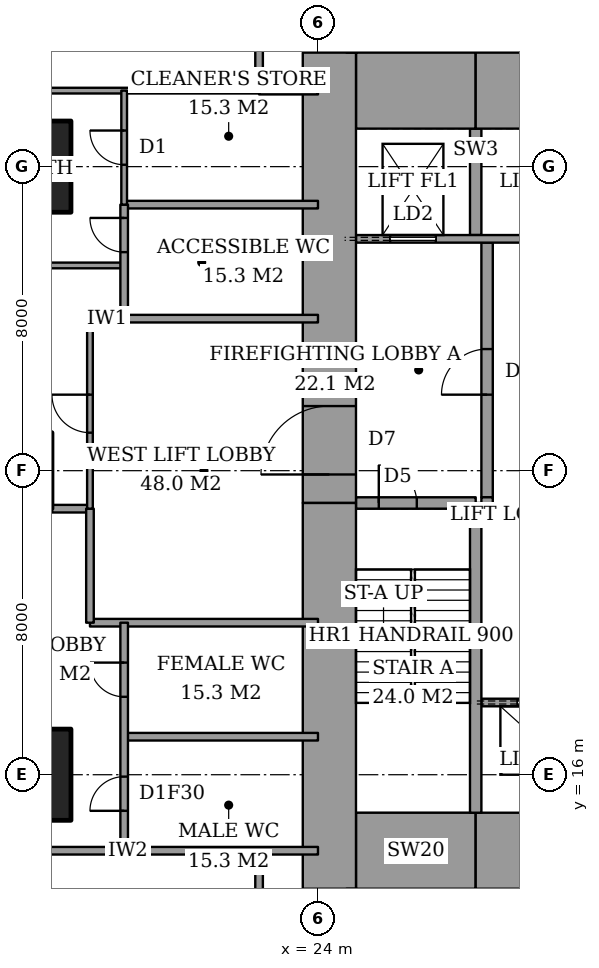
"""IFC4 building model, lengths in metres.
Left out: names, types, materials, properties, quantities, classifications, styles, units other than length and angle.
Written with IfcOpenShell. Run it as: python <this file> out.ifc"""

import sys

from ifc_helpers import new_model, si_unit, direction, frame, frame_2d, origin, origin_2d, place, context, subcontext, project, spatial, rectangle, extrude, element, fill, save


model = new_model("IFC4")
c1 = context("Model", 3, precision=1e-05, world=origin(), true_north=direction((0.0, 1.0)))
c2 = subcontext(c1, "Body", "Model", "MODEL_VIEW")
j1 = project(units=[si_unit("LENGTHUNIT", "METRE"), si_unit("PLANEANGLEUNIT", "RADIAN")], contexts=[c1])
p1 = place(None, origin())
s1 = spatial("IfcSite", under=j1, at=p1, CompositionType="ELEMENT")
p2 = place(p1, origin())
s2 = spatial("IfcBuilding", under=s1, at=p2, CompositionType="ELEMENT")
p3 = place(p2, frame((0.0, 0.0, 16.0)))
s3 = spatial("IfcBuildingStorey", under=s2, at=p3, CompositionType="ELEMENT", Elevation=16.0)
for number, where, z_axis, x_axis in (
    (1, (16.0, 16.0, 0.0), (0.0, 0.0, 1.0), (1.0, 0.0, 0.0)),
    (2, (16.0, 32.0, 0.0), (0.0, 0.0, 1.0), (1.0, 0.0, 0.0)),
):
    element("IfcColumn", number, at=place(p3, frame(where, z_axis=z_axis, x_axis=x_axis)), inside=s3, PredefinedType="COLUMN", context=c2, shape_type="SweptSolid", body=[
        extrude(rectangle(XDim=3.0, YDim=2.4, at=origin_2d()), origin(), (0.0, 0.0, 1.0), 5.0),
    ])
p4 = place(p3, frame((25.0, 14.0, 0.0), z_axis=(0.0, 0.0, 1.0), x_axis=(1.0, 0.0, 0.0)))
e3 = element("IfcWall", 3, at=p4, inside=s3, PredefinedType="SHEAR", context=c2, shape_type="SweptSolid", body=[
    extrude(rectangle(XDim=3.15, YDim=2.0, at=frame_2d((1.575, 0.0))), origin(), (0.0, 0.0, 1.0), 5.0),
])
p5 = place(p3, frame((28.15, 14.0, 0.0), z_axis=(0.0, 0.0, 1.0), x_axis=(1.0, 0.0, 0.0)))
e4 = element("IfcWall", 4, at=p5, inside=s3, PredefinedType="SHEAR", context=c2, shape_type="SweptSolid", body=[
    extrude(rectangle(XDim=9.7, YDim=2.0, at=frame_2d((4.85, 0.0))), origin(), (0.0, 0.0, 1.0), 5.0),
])
p6 = place(p3, frame((25.0, 34.0, 0.0), z_axis=(0.0, 0.0, 1.0), x_axis=(1.0, 0.0, 0.0)))
e5 = element("IfcWall", 5, at=p6, inside=s3, PredefinedType="SHEAR", context=c2, shape_type="SweptSolid", body=[
    extrude(rectangle(XDim=3.15, YDim=2.0, at=frame_2d((1.575, 0.0))), origin(), (0.0, 0.0, 1.0), 5.0),
])
p7 = place(p3, frame((28.15, 34.0, 0.0), z_axis=(0.0, 0.0, 1.0), x_axis=(1.0, 0.0, 0.0)))
e6 = element("IfcWall", 6, at=p7, inside=s3, PredefinedType="SHEAR", context=c2, shape_type="SweptSolid", body=[
    extrude(rectangle(XDim=9.7, YDim=2.0, at=frame_2d((4.85, 0.0))), origin(), (0.0, 0.0, 1.0), 5.0),
])
p8 = place(p3, frame((24.3, 13.0, 0.0), z_axis=(0.0, 0.0, 1.0), x_axis=(0.0, 1.0, 0.0)))
e7 = element("IfcWall", 7, at=p8, inside=s3, PredefinedType="SHEAR", context=c2, shape_type="SweptSolid", body=[
    extrude(rectangle(XDim=10.15, YDim=1.4, at=frame_2d((5.075, 0.0))), origin(), (0.0, 0.0, 1.0), 5.0),
])
p9 = place(p3, frame((24.3, 23.15, 0.0), z_axis=(0.0, 0.0, 1.0), x_axis=(0.0, 1.0, 0.0)))
e8 = element("IfcWall", 8, at=p9, inside=s3, PredefinedType="SHEAR", context=c2, shape_type="SweptSolid", body=[
    extrude(rectangle(XDim=11.85, YDim=1.4, at=frame_2d((5.925, 0.0))), origin(), (0.0, 0.0, 1.0), 5.0),
])
p10 = place(p9, frame((0.75, 0.0, 0.0)))
e9 = element("IfcOpeningElement", 9, at=p10, cuts=e8, PredefinedType="OPENING", context=c2, shape_type="SweptSolid", body=[
    extrude(rectangle(XDim=1.8, YDim=2.4, at=frame_2d((0.9, 1.2))), frame((0.0, 0.71, 0.0), z_axis=(0.0, -1.0, 0.0), x_axis=(1.0, 0.0, 0.0)), (0.0, 0.0, 1.0), 1.42),
])
p11 = place(p3, frame((28.15, 15.0, 0.0), z_axis=(0.0, 0.0, 1.0), x_axis=(0.0, 1.0, 0.0)))
e10 = element("IfcWall", 10, at=p11, inside=s3, PredefinedType="SHEAR", context=c2, shape_type="SweptSolid", body=[
    extrude(rectangle(XDim=8.15, YDim=0.3, at=frame_2d((4.075, 0.0))), origin(), (0.0, 0.0, 1.0), 5.0),
])
p12 = place(p3, frame((25.0, 23.15, 0.0), z_axis=(0.0, 0.0, 1.0), x_axis=(1.0, 0.0, 0.0)))
e11 = element("IfcWall", 11, at=p12, inside=s3, PredefinedType="SHEAR", context=c2, shape_type="SweptSolid", body=[
    extrude(rectangle(XDim=3.15, YDim=0.3, at=frame_2d((1.575, 0.0))), origin(), (0.0, 0.0, 1.0), 5.0),
])
p13 = place(p12, frame((0.6, 0.0, 0.0)))
e12 = element("IfcOpeningElement", 12, at=p13, cuts=e11, PredefinedType="OPENING", context=c2, shape_type="SweptSolid", body=[
    extrude(rectangle(XDim=1.0, YDim=2.1, at=frame_2d((0.5, 1.05))), frame((0.0, 0.16, 0.0), z_axis=(0.0, -1.0, 0.0), x_axis=(1.0, 0.0, 0.0)), (0.0, 0.0, 1.0), 0.32),
])
p14 = place(p3, frame((28.45, 23.3, 0.0), z_axis=(0.0, 0.0, 1.0), x_axis=(0.0, 1.0, 0.0)))
e13 = element("IfcWall", 13, at=p14, inside=s3, PredefinedType="PARTITIONING", context=c2, shape_type="SweptSolid", body=[
    extrude(rectangle(XDim=6.7, YDim=0.3, at=frame_2d((3.35, 0.0))), origin(), (0.0, 0.0, 1.0), 5.0),
])
p15 = place(p14, frame((2.7, 0.0, 0.0)))
e14 = element("IfcOpeningElement", 14, at=p15, cuts=e13, PredefinedType="OPENING", context=c2, shape_type="SweptSolid", body=[
    extrude(rectangle(XDim=1.2, YDim=2.1, at=frame_2d((0.6, 1.05))), frame((0.0, 0.16, 0.0), z_axis=(0.0, -1.0, 0.0), x_axis=(1.0, 0.0, 0.0)), (0.0, 0.0, 1.0), 0.32),
])
p16 = place(p3, frame((14.0, 14.0, 0.0), z_axis=(0.0, 0.0, 1.0), x_axis=(1.0, 0.0, 0.0)))
e15 = element("IfcWall", 15, at=p16, inside=s3, PredefinedType="PARTITIONING", context=c2, shape_type="SweptSolid", body=[
    extrude(rectangle(XDim=10.0, YDim=0.2, at=frame_2d((5.0, 0.0))), origin(), (0.0, 0.0, 1.0), 4.7),
])
p17 = place(p3, frame((18.9, 17.0, 0.0), z_axis=(0.0, 0.0, 1.0), x_axis=(1.0, 0.0, 0.0)))
e16 = element("IfcWall", 16, at=p17, inside=s3, PredefinedType="PARTITIONING", context=c2, shape_type="SweptSolid", body=[
    extrude(rectangle(XDim=5.1, YDim=0.2, at=frame_2d((2.55, 0.0))), origin(), (0.0, 0.0, 1.0), 4.7),
])
p18 = place(p3, frame((18.0, 20.0, 0.0), z_axis=(0.0, 0.0, 1.0), x_axis=(1.0, 0.0, 0.0)))
e17 = element("IfcWall", 17, at=p18, inside=s3, PredefinedType="PARTITIONING", context=c2, shape_type="SweptSolid", body=[
    extrude(rectangle(XDim=6.0, YDim=0.2, at=frame_2d((3.0, 0.0))), origin(), (0.0, 0.0, 1.0), 4.7),
])
p19 = place(p3, frame((17.0, 23.0, 0.0), z_axis=(0.0, 0.0, 1.0), x_axis=(1.0, 0.0, 0.0)))
e18 = element("IfcWall", 18, at=p19, inside=s3, PredefinedType="PARTITIONING", context=c2, shape_type="SweptSolid", body=[
    extrude(rectangle(XDim=1.0, YDim=0.2, at=frame_2d((0.5, 0.0))), origin(), (0.0, 0.0, 1.0), 4.7),
])
p20 = place(p3, frame((18.9, 28.0, 0.0), z_axis=(0.0, 0.0, 1.0), x_axis=(1.0, 0.0, 0.0)))
e19 = element("IfcWall", 19, at=p20, inside=s3, PredefinedType="PARTITIONING", context=c2, shape_type="SweptSolid", body=[
    extrude(rectangle(XDim=5.1, YDim=0.2, at=frame_2d((2.55, 0.0))), origin(), (0.0, 0.0, 1.0), 4.7),
])
p21 = place(p3, frame((18.0, 28.0, 0.0), z_axis=(0.0, 0.0, 1.0), x_axis=(1.0, 0.0, 0.0)))
e20 = element("IfcWall", 20, at=p21, inside=s3, PredefinedType="PARTITIONING", context=c2, shape_type="SweptSolid", body=[
    extrude(rectangle(XDim=0.9, YDim=0.15, at=frame_2d((0.45, 0.0))), origin(), (0.0, 0.0, 1.0), 4.7),
])
p22 = place(p3, frame((6.0, 29.4, 0.0), z_axis=(0.0, 0.0, 1.0), x_axis=(1.0, 0.0, 0.0)))
e21 = element("IfcWall", 21, at=p22, inside=s3, PredefinedType="PARTITIONING", context=c2, shape_type="SweptSolid", body=[
    extrude(rectangle(XDim=12.9, YDim=0.15, at=frame_2d((6.45, 0.0))), origin(), (0.0, 0.0, 1.0), 4.7),
])
p23 = place(p22, frame((5.95, 0.0, 0.0)))
e22 = element("IfcOpeningElement", 22, at=p23, cuts=e21, PredefinedType="OPENING", context=c2, shape_type="SweptSolid", body=[
    extrude(rectangle(XDim=1.0, YDim=2.1, at=frame_2d((0.5, 1.05))), frame((0.0, 0.085, 0.0), z_axis=(0.0, -1.0, 0.0), x_axis=(1.0, 0.0, 0.0)), (0.0, 0.0, 1.0), 0.17),
])
p24 = place(p3, frame((18.9, 31.0, 0.0), z_axis=(0.0, 0.0, 1.0), x_axis=(1.0, 0.0, 0.0)))
e23 = element("IfcWall", 23, at=p24, inside=s3, PredefinedType="PARTITIONING", context=c2, shape_type="SweptSolid", body=[
    extrude(rectangle(XDim=5.1, YDim=0.2, at=frame_2d((2.55, 0.0))), origin(), (0.0, 0.0, 1.0), 4.7),
])
p25 = place(p3, frame((22.45, 34.0, 0.0), z_axis=(0.0, 0.0, 1.0), x_axis=(1.0, 0.0, 0.0)))
e24 = element("IfcWall", 24, at=p25, inside=s3, PredefinedType="PARTITIONING", context=c2, shape_type="SweptSolid", body=[
    extrude(rectangle(XDim=1.55, YDim=0.2, at=frame_2d((0.775, 0.0))), origin(), (0.0, 0.0, 1.0), 4.7),
])
p26 = place(p3, frame((6.0, 34.0, 0.0), z_axis=(0.0, 0.0, 1.0), x_axis=(1.0, 0.0, 0.0)))
e25 = element("IfcWall", 25, at=p26, inside=s3, PredefinedType="PARTITIONING", context=c2, shape_type="SweptSolid", body=[
    extrude(rectangle(XDim=16.45, YDim=0.15, at=frame_2d((8.225, 0.0))), origin(), (0.0, 0.0, 1.0), 4.7),
])
p27 = place(p26, frame((5.55, 0.0, 0.0)))
e26 = element("IfcOpeningElement", 26, at=p27, cuts=e25, PredefinedType="OPENING", context=c2, shape_type="SweptSolid", body=[
    extrude(rectangle(XDim=1.8, YDim=2.1, at=frame_2d((0.9, 1.05))), frame((0.0, 0.085, 0.0), z_axis=(0.0, -1.0, 0.0), x_axis=(1.0, 0.0, 0.0)), (0.0, 0.0, 1.0), 0.17),
])
p28 = place(p3, frame((18.0, 20.0, 0.0), z_axis=(0.0, 0.0, 1.0), x_axis=(0.0, 1.0, 0.0)))
e27 = element("IfcWall", 27, at=p28, inside=s3, PredefinedType="PARTITIONING", context=c2, shape_type="SweptSolid", body=[
    extrude(rectangle(XDim=3.0, YDim=0.2, at=frame_2d((1.5, 0.0))), origin(), (0.0, 0.0, 1.0), 4.7),
])
p29 = place(p3, frame((18.0, 23.0, 0.0), z_axis=(0.0, 0.0, 1.0), x_axis=(0.0, 1.0, 0.0)))
e28 = element("IfcWall", 28, at=p29, inside=s3, PredefinedType="PARTITIONING", context=c2, shape_type="SweptSolid", body=[
    extrude(rectangle(XDim=5.0, YDim=0.15, at=frame_2d((2.5, 0.0))), origin(), (0.0, 0.0, 1.0), 4.7),
])
p30 = place(p29, frame((2.0, 0.0, 0.0)))
e29 = element("IfcOpeningElement", 29, at=p30, cuts=e28, PredefinedType="OPENING", context=c2, shape_type="SweptSolid", body=[
    extrude(rectangle(XDim=1.0, YDim=2.1, at=frame_2d((0.5, 1.05))), frame((0.0, 0.085, 0.0), z_axis=(0.0, -1.0, 0.0), x_axis=(1.0, 0.0, 0.0)), (0.0, 0.0, 1.0), 0.17),
])
p31 = place(p3, frame((18.9, 14.0, 0.0), z_axis=(0.0, 0.0, 1.0), x_axis=(0.0, 1.0, 0.0)))
e30 = element("IfcWall", 30, at=p31, inside=s3, PredefinedType="PARTITIONING", context=c2, shape_type="SweptSolid", body=[
    extrude(rectangle(XDim=6.0, YDim=0.2, at=frame_2d((3.0, 0.0))), origin(), (0.0, 0.0, 1.0), 4.7),
])
p32 = place(p31, frame((1.05, 0.0, 0.0)))
e31 = element("IfcOpeningElement", 31, at=p32, cuts=e30, PredefinedType="OPENING", context=c2, shape_type="SweptSolid", body=[
    extrude(rectangle(XDim=0.9, YDim=2.1, at=frame_2d((0.45, 1.05))), frame((0.0, 0.11, 0.0), z_axis=(0.0, -1.0, 0.0), x_axis=(1.0, 0.0, 0.0)), (0.0, 0.0, 1.0), 0.22),
])
p33 = place(p31, frame((4.05, 0.0, 0.0)))
e32 = element("IfcOpeningElement", 32, at=p33, cuts=e30, PredefinedType="OPENING", context=c2, shape_type="SweptSolid", body=[
    extrude(rectangle(XDim=0.9, YDim=2.1, at=frame_2d((0.45, 1.05))), frame((0.0, 0.11, 0.0), z_axis=(0.0, -1.0, 0.0), x_axis=(1.0, 0.0, 0.0)), (0.0, 0.0, 1.0), 0.22),
])
p34 = place(p3, frame((18.9, 28.0, 0.0), z_axis=(0.0, 0.0, 1.0), x_axis=(0.0, 1.0, 0.0)))
e33 = element("IfcWall", 33, at=p34, inside=s3, PredefinedType="PARTITIONING", context=c2, shape_type="SweptSolid", body=[
    extrude(rectangle(XDim=3.0, YDim=0.2, at=frame_2d((1.5, 0.0))), origin(), (0.0, 0.0, 1.0), 4.7),
])
p35 = place(p34, frame((1.75, 0.0, 0.0)))
e34 = element("IfcOpeningElement", 34, at=p35, cuts=e33, PredefinedType="OPENING", context=c2, shape_type="SweptSolid", body=[
    extrude(rectangle(XDim=0.9, YDim=2.1, at=frame_2d((0.45, 1.05))), frame((0.0, 0.11, 0.0), z_axis=(0.0, -1.0, 0.0), x_axis=(1.0, 0.0, 0.0)), (0.0, 0.0, 1.0), 0.22),
])
p36 = place(p3, frame((18.9, 31.0, 0.0), z_axis=(0.0, 0.0, 1.0), x_axis=(0.0, 1.0, 0.0)))
e35 = element("IfcWall", 35, at=p36, inside=s3, PredefinedType="PARTITIONING", context=c2, shape_type="SweptSolid", body=[
    extrude(rectangle(XDim=3.0, YDim=0.15, at=frame_2d((1.5, 0.0))), origin(), (0.0, 0.0, 1.0), 4.7),
])
p37 = place(p36, frame((1.05, 0.0, 0.0)))
e36 = element("IfcOpeningElement", 36, at=p37, cuts=e35, PredefinedType="OPENING", context=c2, shape_type="SweptSolid", body=[
    extrude(rectangle(XDim=0.9, YDim=2.1, at=frame_2d((0.45, 1.05))), frame((0.0, 0.085, 0.0), z_axis=(0.0, -1.0, 0.0), x_axis=(1.0, 0.0, 0.0)), (0.0, 0.0, 1.0), 0.17),
])
p38 = place(p3, frame((22.45, -0.45, 0.0), z_axis=(0.0, 0.0, 1.0), x_axis=(0.0, 1.0, 0.0)))
e37 = element("IfcWall", 37, at=p38, inside=s3, PredefinedType="PARTITIONING", context=c2, shape_type="SweptSolid", body=[
    extrude(rectangle(XDim=14.45, YDim=0.2, at=frame_2d((7.225, 0.0))), origin(), (0.0, 0.0, 1.0), 4.7),
])
p39 = place(p3, frame((22.45, 34.0, 0.0), z_axis=(0.0, 0.0, 1.0), x_axis=(0.0, 1.0, 0.0)))
e38 = element("IfcWall", 38, at=p39, inside=s3, PredefinedType="PARTITIONING", context=c2, shape_type="SweptSolid", body=[
    extrude(rectangle(XDim=14.561, YDim=0.2, at=frame_2d((7.281, 0.0))), origin(), (0.0, 0.0, 1.0), 4.7),
])
p40 = place(p3, frame((24.85, -0.45, 0.0), z_axis=(0.0, 0.0, 1.0), x_axis=(0.0, 1.0, 0.0)))
e39 = element("IfcWall", 39, at=p40, inside=s3, PredefinedType="PARTITIONING", context=c2, shape_type="SweptSolid", body=[
    extrude(rectangle(XDim=13.45, YDim=0.2, at=frame_2d((6.725, 0.0))), origin(), (0.0, 0.0, 1.0), 4.7),
])
p41 = place(p3, frame((28.3, 17.9, 0.0), z_axis=(0.0, 0.0, 1.0), x_axis=(1.0, 0.0, 0.0)))
e40 = element("IfcWall", 40, at=p41, inside=s3, PredefinedType="PARTITIONING", context=c2, shape_type="SweptSolid", body=[
    extrude(rectangle(XDim=12.7, YDim=0.2, at=frame_2d((6.35, 0.0))), origin(), (0.0, 0.0, 1.0), 5.0),
])
p42 = place(p41, frame((0.95, 0.0, 0.0)))
e41 = element("IfcOpeningElement", 41, at=p42, cuts=e40, PredefinedType="OPENING", context=c2, shape_type="SweptSolid", body=[
    extrude(rectangle(XDim=1.1, YDim=2.1, at=frame_2d((0.55, 1.05))), frame((0.0, 0.11, 0.0), z_axis=(0.0, -1.0, 0.0), x_axis=(1.0, 0.0, 0.0)), (0.0, 0.0, 1.0), 0.22),
])
p43 = place(p41, frame((4.15, 0.0, 0.0)))
e42 = element("IfcOpeningElement", 42, at=p43, cuts=e40, PredefinedType="OPENING", context=c2, shape_type="SweptSolid", body=[
    extrude(rectangle(XDim=1.1, YDim=2.1, at=frame_2d((0.55, 1.05))), frame((0.0, 0.11, 0.0), z_axis=(0.0, -1.0, 0.0), x_axis=(1.0, 0.0, 0.0)), (0.0, 0.0, 1.0), 0.22),
])
p44 = place(p41, frame((7.35, 0.0, 0.0)))
e43 = element("IfcOpeningElement", 43, at=p44, cuts=e40, PredefinedType="OPENING", context=c2, shape_type="SweptSolid", body=[
    extrude(rectangle(XDim=1.1, YDim=2.1, at=frame_2d((0.55, 1.05))), frame((0.0, 0.11, 0.0), z_axis=(0.0, -1.0, 0.0), x_axis=(1.0, 0.0, 0.0)), (0.0, 0.0, 1.0), 0.22),
])
p45 = place(p41, frame((10.6, 0.0, 0.0)))
e44 = element("IfcOpeningElement", 44, at=p45, cuts=e40, PredefinedType="OPENING", context=c2, shape_type="SweptSolid", body=[
    extrude(rectangle(XDim=1.2, YDim=2.1, at=frame_2d((0.6, 1.05))), frame((0.0, 0.11, 0.0), z_axis=(0.0, -1.0, 0.0), x_axis=(1.0, 0.0, 0.0)), (0.0, 0.0, 1.0), 0.22),
])
p46 = place(p3, frame((25.0, 30.1, 0.0), z_axis=(0.0, 0.0, 1.0), x_axis=(1.0, 0.0, 0.0)))
e45 = element("IfcWall", 45, at=p46, inside=s3, PredefinedType="PARTITIONING", context=c2, shape_type="SweptSolid", body=[
    extrude(rectangle(XDim=12.7, YDim=0.2, at=frame_2d((6.35, 0.0))), origin(), (0.0, 0.0, 1.0), 5.0),
])
p47 = place(p46, frame((0.9, 0.0, 0.0)))
e46 = element("IfcOpeningElement", 46, at=p47, cuts=e45, PredefinedType="OPENING", context=c2, shape_type="SweptSolid", body=[
    extrude(rectangle(XDim=1.2, YDim=2.1, at=frame_2d((0.6, 1.05))), frame((0.0, 0.11, 0.0), z_axis=(0.0, -1.0, 0.0), x_axis=(1.0, 0.0, 0.0)), (0.0, 0.0, 1.0), 0.22),
])
p48 = place(p3, frame((28.15, 30.2, 0.0), z_axis=(0.0, 0.0, 1.0), x_axis=(0.0, 1.0, 0.0)))
e47 = element("IfcWall", 47, at=p48, inside=s3, PredefinedType="SHEAR", context=c2, shape_type="SweptSolid", body=[
    extrude(rectangle(XDim=2.8, YDim=0.3, at=frame_2d((1.4, 0.0))), origin(), (0.0, 0.0, 1.0), 5.0),
])
p49 = place(p3, frame((28.3, 23.2, 0.0), z_axis=(0.0, 0.0, 1.0), x_axis=(1.0, 0.0, 0.0)))
e48 = element("IfcWall", 48, at=p49, inside=s3, PredefinedType="PARTITIONING", context=c2, shape_type="SweptSolid", body=[
    extrude(rectangle(XDim=0.3, YDim=0.2, at=frame_2d((0.15, 0.0))), origin(), (0.0, 0.0, 1.0), 5.0),
])
p50 = place(p30, origin())
e49 = element("IfcDoor", 49, at=p50, inside=s3, OperationType="SINGLE_SWING_LEFT", PredefinedType="DOOR", context=c2, shape_type="SweptSolid", body=[
    extrude(rectangle(XDim=1.0, YDim=2.1, at=frame_2d((0.5, 1.05))), frame((0.0, 0.025, 0.0), z_axis=(0.0, -1.0, 0.0), x_axis=(1.0, 0.0, 0.0)), (0.0, 0.0, 1.0), 0.05),
])
fill(e29, e49)
p51 = place(p32, origin())
e50 = element("IfcDoor", 50, at=p51, inside=s3, OperationType="SINGLE_SWING_RIGHT", PredefinedType="DOOR", context=c2, shape_type="SweptSolid", body=[
    extrude(rectangle(XDim=0.9, YDim=2.1, at=frame_2d((0.45, 1.05))), frame((0.0, 0.025, 0.0), z_axis=(0.0, -1.0, 0.0), x_axis=(1.0, 0.0, 0.0)), (0.0, 0.0, 1.0), 0.05),
])
fill(e31, e50)
p52 = place(p33, origin())
e51 = element("IfcDoor", 51, at=p52, inside=s3, OperationType="SINGLE_SWING_LEFT", PredefinedType="DOOR", context=c2, shape_type="SweptSolid", body=[
    extrude(rectangle(XDim=0.9, YDim=2.1, at=frame_2d((0.45, 1.05))), frame((0.0, 0.025, 0.0), z_axis=(0.0, -1.0, 0.0), x_axis=(1.0, 0.0, 0.0)), (0.0, 0.0, 1.0), 0.05),
])
fill(e32, e51)
p53 = place(p35, origin())
e52 = element("IfcDoor", 52, at=p53, inside=s3, OperationType="SINGLE_SWING_LEFT", PredefinedType="DOOR", context=c2, shape_type="SweptSolid", body=[
    extrude(rectangle(XDim=0.9, YDim=2.1, at=frame_2d((0.45, 1.05))), frame((0.0, 0.025, 0.0), z_axis=(0.0, -1.0, 0.0), x_axis=(1.0, 0.0, 0.0)), (0.0, 0.0, 1.0), 0.05),
])
fill(e34, e52)
p54 = place(p37, origin())
e53 = element("IfcDoor", 53, at=p54, inside=s3, OperationType="SINGLE_SWING_LEFT", PredefinedType="DOOR", context=c2, shape_type="SweptSolid", body=[
    extrude(rectangle(XDim=0.9, YDim=2.1, at=frame_2d((0.45, 1.05))), frame((0.0, 0.025, 0.0), z_axis=(0.0, -1.0, 0.0), x_axis=(1.0, 0.0, 0.0)), (0.0, 0.0, 1.0), 0.05),
])
fill(e36, e53)
p55 = place(p13, origin())
e54 = element("IfcDoor", 54, at=p55, inside=s3, OperationType="SINGLE_SWING_RIGHT", PredefinedType="DOOR", context=c2, shape_type="SweptSolid", body=[
    extrude(rectangle(XDim=1.0, YDim=2.1, at=frame_2d((0.5, 1.05))), frame((0.0, 0.025, 0.0), z_axis=(0.0, -1.0, 0.0), x_axis=(1.0, 0.0, 0.0)), (0.0, 0.0, 1.0), 0.05),
])
fill(e12, e54)
p56 = place(p15, origin())
e55 = element("IfcDoor", 55, at=p56, inside=s3, OperationType="SINGLE_SWING_RIGHT", PredefinedType="DOOR", context=c2, shape_type="SweptSolid", body=[
    extrude(rectangle(XDim=1.2, YDim=2.1, at=frame_2d((0.6, 1.05))), frame((0.0, 0.025, 0.0), z_axis=(0.0, -1.0, 0.0), x_axis=(1.0, 0.0, 0.0)), (0.0, 0.0, 1.0), 0.05),
])
fill(e14, e55)
p57 = place(p10, origin())
e56 = element("IfcDoor", 56, at=p57, inside=s3, OperationType="DOUBLE_DOOR_DOUBLE_SWING", PredefinedType="DOOR", context=c2, shape_type="SweptSolid", body=[
    extrude(rectangle(XDim=1.8, YDim=2.4, at=frame_2d((0.9, 1.2))), frame((0.0, 0.025, 0.0), z_axis=(0.0, -1.0, 0.0), x_axis=(1.0, 0.0, 0.0)), (0.0, 0.0, 1.0), 0.05),
])
fill(e9, e56)
p58 = place(p42, origin())
e57 = element("IfcDoor", 57, at=p58, inside=s3, OperationType="SLIDING_TO_LEFT", PredefinedType="DOOR", context=c2, shape_type="SweptSolid", body=[
    extrude(rectangle(XDim=1.1, YDim=2.1, at=frame_2d((0.55, 1.05))), frame((0.0, 0.025, 0.0), z_axis=(0.0, -1.0, 0.0), x_axis=(1.0, 0.0, 0.0)), (0.0, 0.0, 1.0), 0.05),
])
fill(e41, e57)
p59 = place(p47, origin())
e58 = element("IfcDoor", 58, at=p59, inside=s3, OperationType="SLIDING_TO_LEFT", PredefinedType="DOOR", context=c2, shape_type="SweptSolid", body=[
    extrude(rectangle(XDim=1.2, YDim=2.1, at=frame_2d((0.6, 1.05))), frame((0.0, 0.025, 0.0), z_axis=(0.0, -1.0, 0.0), x_axis=(1.0, 0.0, 0.0)), (0.0, 0.0, 1.0), 0.05),
])
fill(e46, e58)
save(model, sys.argv[1])
